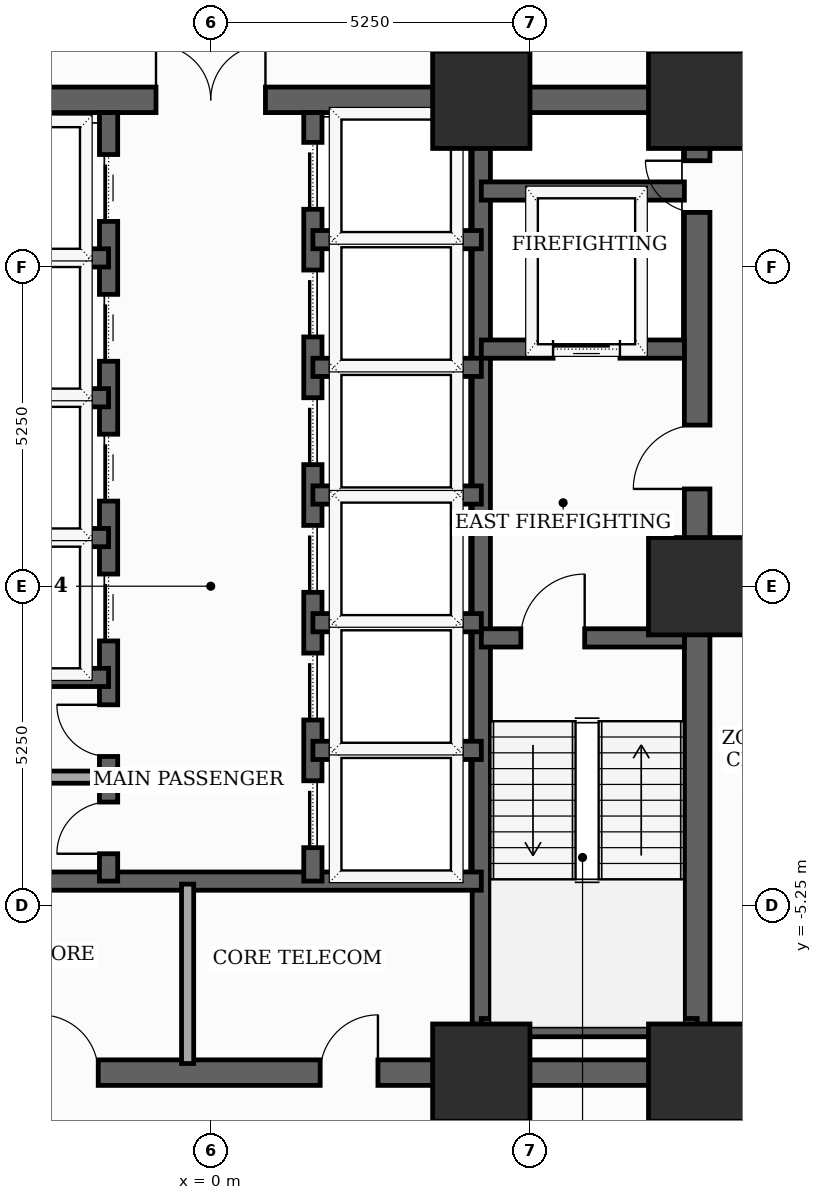
"""IFC4 building model, lengths in metres.
Left out: names, types, materials, properties, quantities, classifications, styles, units other than length and angle.
Written with IfcOpenShell. Run it as: python <this file> out.ifc"""

import sys

from ifc_helpers import new_model, si_unit, direction, frame, frame_2d, origin, origin_2d, place, context, subcontext, project, spatial, rectangle, extrude, element, fill, save


model = new_model("IFC4")
c1 = context("Model", 3, precision=1e-05, world=origin(), true_north=direction((0.0, 1.0)))
c2 = subcontext(c1, "Body", "Model", "MODEL_VIEW")
j1 = project(units=[si_unit("LENGTHUNIT", "METRE"), si_unit("PLANEANGLEUNIT", "RADIAN")], contexts=[c1])
p1 = place(None, origin())
s1 = spatial("IfcSite", under=j1, at=p1, CompositionType="ELEMENT")
p2 = place(p1, origin())
s2 = spatial("IfcBuilding", under=s1, at=p2, CompositionType="ELEMENT")
p3 = place(p2, frame((0.0, 0.0, 63.0)))
s3 = spatial("IfcBuildingStorey", under=s2, at=p3, CompositionType="ELEMENT", Elevation=63.0)
for number, where, z_axis, x_axis in (
    (1, (4.45, -8.0, 0.0), (0.0, 0.0, 1.0), (1.0, 0.0, 0.0)),
    (2, (8.0, -8.0, 0.0), (0.0, 0.0, 1.0), (1.0, 0.0, 0.0)),
    (3, (8.0, 0.0, 0.0), (0.0, 0.0, 1.0), (1.0, 0.0, 0.0)),
    (4, (8.0, 8.0, 0.0), (0.0, 0.0, 1.0), (1.0, 0.0, 0.0)),
    (5, (4.45, 8.0, 0.0), (0.0, 0.0, 1.0), (1.0, 0.0, 0.0)),
):
    element("IfcColumn", number, at=place(p3, frame(where, z_axis=z_axis, x_axis=x_axis)), inside=s3, PredefinedType="COLUMN", context=c2, shape_type="SweptSolid", body=[
        extrude(rectangle(XDim=1.6, YDim=1.6, at=origin_2d()), origin(), (0.0, 0.0, 1.0), 3.7),
    ])
p4 = place(p3, frame((8.0, -8.0, 0.0), z_axis=(0.0, 0.0, 1.0), x_axis=(0.0, 1.0, 0.0)))
e6 = element("IfcWall", 6, at=p4, inside=s3, PredefinedType="SHEAR", context=c2, shape_type="SweptSolid", body=[
    extrude(rectangle(XDim=16.0, YDim=0.42, at=frame_2d((8.0, 0.0))), origin(), (0.0, 0.0, 1.0), 3.5),
])
p5 = place(p4, frame((9.6, 0.0, 0.0)))
e7 = element("IfcOpeningElement", 7, at=p5, cuts=e6, PredefinedType="OPENING", context=c2, shape_type="SweptSolid", body=[
    extrude(rectangle(XDim=1.05, YDim=2.15, at=frame_2d((0.525, 1.075))), frame((0.0, 0.22, 0.0), z_axis=(0.0, -1.0, 0.0), x_axis=(1.0, 0.0, 0.0)), (0.0, 0.0, 1.0), 0.44),
])
p6 = place(p4, frame((14.148, 0.0, 0.0)))
e8 = element("IfcOpeningElement", 8, at=p6, cuts=e6, PredefinedType="OPENING", context=c2, shape_type="SweptSolid", body=[
    extrude(rectangle(XDim=0.85, YDim=2.02, at=frame_2d((0.425, 1.01))), frame((0.0, 0.22, 0.0), z_axis=(0.0, -1.0, 0.0), x_axis=(1.0, 0.0, 0.0)), (0.0, 0.0, 1.0), 0.44),
])
p7 = place(p3, frame((-8.0, -8.0, 0.0), z_axis=(0.0, 0.0, 1.0), x_axis=(1.0, 0.0, 0.0)))
e9 = element("IfcWall", 9, at=p7, inside=s3, PredefinedType="SHEAR", context=c2, shape_type="SweptSolid", body=[
    extrude(rectangle(XDim=16.0, YDim=0.42, at=frame_2d((8.0, 0.0))), origin(), (0.0, 0.0, 1.0), 3.5),
])
p8 = place(p7, frame((5.2, 0.0, 0.0)))
e10 = element("IfcOpeningElement", 10, at=p8, cuts=e9, PredefinedType="OPENING", context=c2, shape_type="SweptSolid", body=[
    extrude(rectangle(XDim=0.95, YDim=2.1, at=frame_2d((0.475, 1.05))), frame((0.0, 0.22, 0.0), z_axis=(0.0, -1.0, 0.0), x_axis=(1.0, 0.0, 0.0)), (0.0, 0.0, 1.0), 0.44),
])
p9 = place(p7, frame((9.8, 0.0, 0.0)))
e11 = element("IfcOpeningElement", 11, at=p9, cuts=e9, PredefinedType="OPENING", context=c2, shape_type="SweptSolid", body=[
    extrude(rectangle(XDim=0.95, YDim=2.1, at=frame_2d((0.475, 1.05))), frame((0.0, 0.22, 0.0), z_axis=(0.0, -1.0, 0.0), x_axis=(1.0, 0.0, 0.0)), (0.0, 0.0, 1.0), 0.44),
])
p10 = place(p3, frame((-8.0, 8.0, 0.0), z_axis=(0.0, 0.0, 1.0), x_axis=(1.0, 0.0, 0.0)))
e12 = element("IfcWall", 12, at=p10, inside=s3, PredefinedType="SHEAR", context=c2, shape_type="SweptSolid", body=[
    extrude(rectangle(XDim=16.0, YDim=0.42, at=frame_2d((8.0, 0.0))), origin(), (0.0, 0.0, 1.0), 3.5),
])
p11 = place(p10, frame((7.1, 0.0, 0.0)))
e13 = element("IfcOpeningElement", 13, at=p11, cuts=e12, PredefinedType="OPENING", context=c2, shape_type="SweptSolid", body=[
    extrude(rectangle(XDim=1.8, YDim=2.15, at=frame_2d((0.9, 1.075))), frame((0.0, 0.22, 0.0), z_axis=(0.0, -1.0, 0.0), x_axis=(1.0, 0.0, 0.0)), (0.0, 0.0, 1.0), 0.44),
])
p12 = place(p3, frame((4.45, -7.79, 0.0), z_axis=(0.0, 0.0, 1.0), x_axis=(0.0, 1.0, 0.0)))
e14 = element("IfcWall", 14, at=p12, inside=s3, PredefinedType="SHEAR", context=c2, shape_type="SweptSolid", body=[
    extrude(rectangle(XDim=15.58, YDim=0.3, at=frame_2d((7.79, 0.0))), origin(), (0.0, 0.0, 1.0), 3.5),
])
p13 = place(p3, frame((4.45, -0.85, 0.0), z_axis=(0.0, 0.0, 1.0), x_axis=(1.0, 0.0, 0.0)))
e15 = element("IfcWall", 15, at=p13, inside=s3, PredefinedType="SHEAR", context=c2, shape_type="SweptSolid", body=[
    extrude(rectangle(XDim=3.34, YDim=0.3, at=frame_2d((1.67, 0.0))), origin(), (0.0, 0.0, 1.0), 3.5),
])
p14 = place(p13, frame((0.65, 0.0, 0.0)))
e16 = element("IfcOpeningElement", 16, at=p14, cuts=e15, PredefinedType="OPENING", context=c2, shape_type="SweptSolid", body=[
    extrude(rectangle(XDim=1.05, YDim=2.15, at=frame_2d((0.525, 1.075))), frame((0.0, 0.16, 0.0), z_axis=(0.0, -1.0, 0.0), x_axis=(1.0, 0.0, 0.0)), (0.0, 0.0, 1.0), 0.32),
])
p15 = place(p3, frame((4.45, -7.26, 0.0), z_axis=(0.0, 0.0, 1.0), x_axis=(1.0, 0.0, 0.0)))
e17 = element("IfcWall", 17, at=p15, inside=s3, PredefinedType="SHEAR", context=c2, shape_type="SweptSolid", body=[
    extrude(rectangle(XDim=3.55, YDim=0.3, at=frame_2d((1.775, 0.0))), origin(), (0.0, 0.0, 1.0), 3.5),
])
p16 = place(p3, frame((4.45, 3.9, 0.0), z_axis=(0.0, 0.0, 1.0), x_axis=(1.0, 0.0, 0.0)))
e18 = element("IfcWall", 18, at=p16, inside=s3, PredefinedType="SHEAR", context=c2, shape_type="SweptSolid", body=[
    extrude(rectangle(XDim=3.34, YDim=0.3, at=frame_2d((1.67, 0.0))), origin(), (0.0, 0.0, 1.0), 3.5),
])
p17 = place(p16, frame((1.18, 0.0, 0.0)))
e19 = element("IfcOpeningElement", 19, at=p17, cuts=e18, PredefinedType="OPENING", context=c2, shape_type="SweptSolid", body=[
    extrude(rectangle(XDim=1.1, YDim=2.1, at=frame_2d((0.55, 1.05))), frame((0.0, 0.16, 0.0), z_axis=(0.0, -1.0, 0.0), x_axis=(1.0, 0.0, 0.0)), (0.0, 0.0, 1.0), 0.32),
])
p18 = place(p3, frame((4.45, 6.5, 0.0), z_axis=(0.0, 0.0, 1.0), x_axis=(1.0, 0.0, 0.0)))
e20 = element("IfcWall", 20, at=p18, inside=s3, PredefinedType="SHEAR", context=c2, shape_type="SweptSolid", body=[
    extrude(rectangle(XDim=3.34, YDim=0.3, at=frame_2d((1.67, 0.0))), origin(), (0.0, 0.0, 1.0), 3.5),
])
p19 = place(p3, frame((-4.45, -4.85, 0.0), z_axis=(0.0, 0.0, 1.0), x_axis=(1.0, 0.0, 0.0)))
e21 = element("IfcWall", 21, at=p19, inside=s3, PredefinedType="SHEAR", context=c2, shape_type="SweptSolid", body=[
    extrude(rectangle(XDim=8.9, YDim=0.3, at=frame_2d((4.45, 0.0))), origin(), (0.0, 0.0, 1.0), 3.5),
])
p20 = place(p3, frame((-1.68, -4.85, 0.0), z_axis=(0.0, 0.0, 1.0), x_axis=(0.0, 1.0, 0.0)))
e22 = element("IfcWall", 22, at=p20, inside=s3, PredefinedType="SHEAR", context=c2, shape_type="SweptSolid", body=[
    extrude(rectangle(XDim=12.64, YDim=0.3, at=frame_2d((6.32, 0.0))), origin(), (0.0, 0.0, 1.0), 3.5),
])
p21 = place(p20, frame((3.95, 0.0, 0.0)))
e23 = element("IfcOpeningElement", 23, at=p21, cuts=e22, PredefinedType="OPENING", context=c2, shape_type="SweptSolid", body=[
    extrude(rectangle(XDim=1.1, YDim=2.1, at=frame_2d((0.55, 1.05))), frame((0.0, 0.16, 0.0), z_axis=(0.0, -1.0, 0.0), x_axis=(1.0, 0.0, 0.0)), (0.0, 0.0, 1.0), 0.32),
])
p22 = place(p20, frame((6.25, 0.0, 0.0)))
e24 = element("IfcOpeningElement", 24, at=p22, cuts=e22, PredefinedType="OPENING", context=c2, shape_type="SweptSolid", body=[
    extrude(rectangle(XDim=1.1, YDim=2.1, at=frame_2d((0.55, 1.05))), frame((0.0, 0.16, 0.0), z_axis=(0.0, -1.0, 0.0), x_axis=(1.0, 0.0, 0.0)), (0.0, 0.0, 1.0), 0.32),
])
p23 = place(p20, frame((8.55, 0.0, 0.0)))
e25 = element("IfcOpeningElement", 25, at=p23, cuts=e22, PredefinedType="OPENING", context=c2, shape_type="SweptSolid", body=[
    extrude(rectangle(XDim=1.1, YDim=2.1, at=frame_2d((0.55, 1.05))), frame((0.0, 0.16, 0.0), z_axis=(0.0, -1.0, 0.0), x_axis=(1.0, 0.0, 0.0)), (0.0, 0.0, 1.0), 0.32),
])
p24 = place(p20, frame((10.85, 0.0, 0.0)))
e26 = element("IfcOpeningElement", 26, at=p24, cuts=e22, PredefinedType="OPENING", context=c2, shape_type="SweptSolid", body=[
    extrude(rectangle(XDim=1.1, YDim=2.1, at=frame_2d((0.55, 1.05))), frame((0.0, 0.16, 0.0), z_axis=(0.0, -1.0, 0.0), x_axis=(1.0, 0.0, 0.0)), (0.0, 0.0, 1.0), 0.32),
])
p25 = place(p20, frame((0.45, 0.0, 0.0)))
e27 = element("IfcOpeningElement", 27, at=p25, cuts=e22, PredefinedType="OPENING", context=c2, shape_type="SweptSolid", body=[
    extrude(rectangle(XDim=0.85, YDim=2.02, at=frame_2d((0.425, 1.01))), frame((0.0, 0.16, 0.0), z_axis=(0.0, -1.0, 0.0), x_axis=(1.0, 0.0, 0.0)), (0.0, 0.0, 1.0), 0.32),
])
p26 = place(p20, frame((2.05, 0.0, 0.0)))
e28 = element("IfcOpeningElement", 28, at=p26, cuts=e22, PredefinedType="OPENING", context=c2, shape_type="SweptSolid", body=[
    extrude(rectangle(XDim=0.85, YDim=2.02, at=frame_2d((0.425, 1.01))), frame((0.0, 0.16, 0.0), z_axis=(0.0, -1.0, 0.0), x_axis=(1.0, 0.0, 0.0)), (0.0, 0.0, 1.0), 0.32),
])
p27 = place(p3, frame((1.68, -4.85, 0.0), z_axis=(0.0, 0.0, 1.0), x_axis=(0.0, 1.0, 0.0)))
e29 = element("IfcWall", 29, at=p27, inside=s3, PredefinedType="SHEAR", context=c2, shape_type="SweptSolid", body=[
    extrude(rectangle(XDim=12.64, YDim=0.3, at=frame_2d((6.32, 0.0))), origin(), (0.0, 0.0, 1.0), 3.5),
])
p28 = place(p27, frame((0.55, 0.0, 0.0)))
e30 = element("IfcOpeningElement", 30, at=p28, cuts=e29, PredefinedType="OPENING", context=c2, shape_type="SweptSolid", body=[
    extrude(rectangle(XDim=1.1, YDim=2.1, at=frame_2d((0.55, 1.05))), frame((0.0, 0.16, 0.0), z_axis=(0.0, -1.0, 0.0), x_axis=(1.0, 0.0, 0.0)), (0.0, 0.0, 1.0), 0.32),
])
p29 = place(p27, frame((2.65, 0.0, 0.0)))
e31 = element("IfcOpeningElement", 31, at=p29, cuts=e29, PredefinedType="OPENING", context=c2, shape_type="SweptSolid", body=[
    extrude(rectangle(XDim=1.1, YDim=2.1, at=frame_2d((0.55, 1.05))), frame((0.0, 0.16, 0.0), z_axis=(0.0, -1.0, 0.0), x_axis=(1.0, 0.0, 0.0)), (0.0, 0.0, 1.0), 0.32),
])
p30 = place(p27, frame((4.75, 0.0, 0.0)))
e32 = element("IfcOpeningElement", 32, at=p30, cuts=e29, PredefinedType="OPENING", context=c2, shape_type="SweptSolid", body=[
    extrude(rectangle(XDim=1.1, YDim=2.1, at=frame_2d((0.55, 1.05))), frame((0.0, 0.16, 0.0), z_axis=(0.0, -1.0, 0.0), x_axis=(1.0, 0.0, 0.0)), (0.0, 0.0, 1.0), 0.32),
])
p31 = place(p27, frame((6.85, 0.0, 0.0)))
e33 = element("IfcOpeningElement", 33, at=p31, cuts=e29, PredefinedType="OPENING", context=c2, shape_type="SweptSolid", body=[
    extrude(rectangle(XDim=1.1, YDim=2.1, at=frame_2d((0.55, 1.05))), frame((0.0, 0.16, 0.0), z_axis=(0.0, -1.0, 0.0), x_axis=(1.0, 0.0, 0.0)), (0.0, 0.0, 1.0), 0.32),
])
p32 = place(p27, frame((8.95, 0.0, 0.0)))
e34 = element("IfcOpeningElement", 34, at=p32, cuts=e29, PredefinedType="OPENING", context=c2, shape_type="SweptSolid", body=[
    extrude(rectangle(XDim=1.1, YDim=2.1, at=frame_2d((0.55, 1.05))), frame((0.0, 0.16, 0.0), z_axis=(0.0, -1.0, 0.0), x_axis=(1.0, 0.0, 0.0)), (0.0, 0.0, 1.0), 0.32),
])
p33 = place(p27, frame((11.05, 0.0, 0.0)))
e35 = element("IfcOpeningElement", 35, at=p33, cuts=e29, PredefinedType="OPENING", context=c2, shape_type="SweptSolid", body=[
    extrude(rectangle(XDim=1.1, YDim=2.1, at=frame_2d((0.55, 1.05))), frame((0.0, 0.16, 0.0), z_axis=(0.0, -1.0, 0.0), x_axis=(1.0, 0.0, 0.0)), (0.0, 0.0, 1.0), 0.32),
])
for number, where, z_axis, x_axis in (
    (36, (-4.45, -1.5, 0.0), (0.0, 0.0, 1.0), (1.0, 0.0, 0.0)),
    (37, (-4.45, 0.8, 0.0), (0.0, 0.0, 1.0), (1.0, 0.0, 0.0)),
    (38, (-4.45, 3.1, 0.0), (0.0, 0.0, 1.0), (1.0, 0.0, 0.0)),
    (39, (-4.45, 5.4, 0.0), (0.0, 0.0, 1.0), (1.0, 0.0, 0.0)),
    (40, (1.68, 1.5, 0.0), (0.0, 0.0, 1.0), (1.0, 0.0, 0.0)),
    (41, (1.68, 3.6, 0.0), (0.0, 0.0, 1.0), (1.0, 0.0, 0.0)),
    (42, (1.68, 5.7, 0.0), (0.0, 0.0, 1.0), (1.0, 0.0, 0.0)),
    (43, (1.68, -2.7, 0.0), (0.0, 0.0, 1.0), (1.0, 0.0, 0.0)),
    (44, (1.68, -0.6, 0.0), (0.0, 0.0, 1.0), (1.0, 0.0, 0.0)),
):
    element("IfcWall", number, at=place(p3, frame(where, z_axis=z_axis, x_axis=x_axis)), inside=s3, PredefinedType="SHEAR", context=c2, shape_type="SweptSolid", body=[
        extrude(rectangle(XDim=2.77, YDim=0.3, at=frame_2d((1.385, 0.0))), origin(), (0.0, 0.0, 1.0), 3.5),
    ])
p34 = place(p3, frame((-0.38, -7.85, 0.0), z_axis=(0.0, 0.0, 1.0), x_axis=(0.0, 1.0, 0.0)))
e45 = element("IfcWall", 45, at=p34, inside=s3, PredefinedType="SOLIDWALL", context=c2, shape_type="SweptSolid", body=[
    extrude(rectangle(XDim=2.95, YDim=0.2, at=frame_2d((1.475, 0.0))), origin(), (0.0, 0.0, 1.0), 2.885),
])
p35 = place(p3, frame((-4.4, -3.14, 0.0), z_axis=(0.0, 0.0, 1.0), x_axis=(1.0, 0.0, 0.0)))
e46 = element("IfcWall", 46, at=p35, inside=s3, PredefinedType="SOLIDWALL", context=c2, shape_type="SweptSolid", body=[
    extrude(rectangle(XDim=2.68, YDim=0.2, at=frame_2d((1.34, 0.0))), origin(), (0.0, 0.0, 1.0), 3.5),
])
p36 = place(p5, origin())
e47 = element("IfcDoor", 47, at=p36, inside=s3, OperationType="SINGLE_SWING_LEFT", PredefinedType="DOOR", context=c2, shape_type="SweptSolid", body=[
    extrude(rectangle(XDim=1.05, YDim=2.15, at=frame_2d((0.525, 1.075))), frame((0.0, 0.025, 0.0), z_axis=(0.0, -1.0, 0.0), x_axis=(1.0, 0.0, 0.0)), (0.0, 0.0, 1.0), 0.05),
])
fill(e7, e47)
p37 = place(p6, origin())
e48 = element("IfcDoor", 48, at=p37, inside=s3, OperationType="SINGLE_SWING_RIGHT", PredefinedType="TRAPDOOR", context=c2, shape_type="SweptSolid", body=[
    extrude(rectangle(XDim=0.85, YDim=2.02, at=frame_2d((0.425, 1.01))), frame((0.0, 0.025, 0.0), z_axis=(0.0, -1.0, 0.0), x_axis=(1.0, 0.0, 0.0)), (0.0, 0.0, 1.0), 0.05),
])
fill(e8, e48)
p38 = place(p8, origin())
e49 = element("IfcDoor", 49, at=p38, inside=s3, OperationType="SINGLE_SWING_LEFT", PredefinedType="DOOR", context=c2, shape_type="SweptSolid", body=[
    extrude(rectangle(XDim=0.95, YDim=2.1, at=frame_2d((0.475, 1.05))), frame((0.0, 0.025, 0.0), z_axis=(0.0, -1.0, 0.0), x_axis=(1.0, 0.0, 0.0)), (0.0, 0.0, 1.0), 0.05),
])
fill(e10, e49)
p39 = place(p9, origin())
e50 = element("IfcDoor", 50, at=p39, inside=s3, OperationType="SINGLE_SWING_RIGHT", PredefinedType="DOOR", context=c2, shape_type="SweptSolid", body=[
    extrude(rectangle(XDim=0.95, YDim=2.1, at=frame_2d((0.475, 1.05))), frame((0.0, 0.025, 0.0), z_axis=(0.0, -1.0, 0.0), x_axis=(1.0, 0.0, 0.0)), (0.0, 0.0, 1.0), 0.05),
])
fill(e11, e50)
p40 = place(p11, origin())
e51 = element("IfcDoor", 51, at=p40, inside=s3, OperationType="DOUBLE_DOOR_SINGLE_SWING", PredefinedType="DOOR", context=c2, shape_type="SweptSolid", body=[
    extrude(rectangle(XDim=1.8, YDim=2.15, at=frame_2d((0.9, 1.075))), frame((0.0, 0.025, 0.0), z_axis=(0.0, -1.0, 0.0), x_axis=(1.0, 0.0, 0.0)), (0.0, 0.0, 1.0), 0.05),
])
fill(e13, e51)
p41 = place(p14, origin())
e52 = element("IfcDoor", 52, at=p41, inside=s3, OperationType="SINGLE_SWING_RIGHT", PredefinedType="DOOR", context=c2, shape_type="SweptSolid", body=[
    extrude(rectangle(XDim=1.05, YDim=2.15, at=frame_2d((0.525, 1.075))), frame((0.0, 0.025, 0.0), z_axis=(0.0, -1.0, 0.0), x_axis=(1.0, 0.0, 0.0)), (0.0, 0.0, 1.0), 0.05),
])
fill(e16, e52)
p42 = place(p17, origin())
e53 = element("IfcDoor", 53, at=p42, inside=s3, OperationType="SLIDING_TO_LEFT", PredefinedType="DOOR", context=c2, shape_type="SweptSolid", body=[
    extrude(rectangle(XDim=1.1, YDim=2.1, at=frame_2d((0.55, 1.05))), frame((0.0, 0.025, 0.0), z_axis=(0.0, -1.0, 0.0), x_axis=(1.0, 0.0, 0.0)), (0.0, 0.0, 1.0), 0.05),
])
fill(e19, e53)
p43 = place(p21, origin())
e54 = element("IfcDoor", 54, at=p43, inside=s3, OperationType="SLIDING_TO_LEFT", PredefinedType="DOOR", context=c2, shape_type="SweptSolid", body=[
    extrude(rectangle(XDim=1.1, YDim=2.1, at=frame_2d((0.55, 1.05))), frame((0.0, 0.025, 0.0), z_axis=(0.0, -1.0, 0.0), x_axis=(1.0, 0.0, 0.0)), (0.0, 0.0, 1.0), 0.05),
])
fill(e23, e54)
p44 = place(p22, origin())
e55 = element("IfcDoor", 55, at=p44, inside=s3, OperationType="SLIDING_TO_LEFT", PredefinedType="DOOR", context=c2, shape_type="SweptSolid", body=[
    extrude(rectangle(XDim=1.1, YDim=2.1, at=frame_2d((0.55, 1.05))), frame((0.0, 0.025, 0.0), z_axis=(0.0, -1.0, 0.0), x_axis=(1.0, 0.0, 0.0)), (0.0, 0.0, 1.0), 0.05),
])
fill(e24, e55)
p45 = place(p23, origin())
e56 = element("IfcDoor", 56, at=p45, inside=s3, OperationType="SLIDING_TO_LEFT", PredefinedType="DOOR", context=c2, shape_type="SweptSolid", body=[
    extrude(rectangle(XDim=1.1, YDim=2.1, at=frame_2d((0.55, 1.05))), frame((0.0, 0.025, 0.0), z_axis=(0.0, -1.0, 0.0), x_axis=(1.0, 0.0, 0.0)), (0.0, 0.0, 1.0), 0.05),
])
fill(e25, e56)
p46 = place(p24, origin())
e57 = element("IfcDoor", 57, at=p46, inside=s3, OperationType="SLIDING_TO_LEFT", PredefinedType="DOOR", context=c2, shape_type="SweptSolid", body=[
    extrude(rectangle(XDim=1.1, YDim=2.1, at=frame_2d((0.55, 1.05))), frame((0.0, 0.025, 0.0), z_axis=(0.0, -1.0, 0.0), x_axis=(1.0, 0.0, 0.0)), (0.0, 0.0, 1.0), 0.05),
])
fill(e26, e57)
p47 = place(p25, origin())
e58 = element("IfcDoor", 58, at=p47, inside=s3, OperationType="SINGLE_SWING_LEFT", PredefinedType="TRAPDOOR", context=c2, shape_type="SweptSolid", body=[
    extrude(rectangle(XDim=0.85, YDim=2.02, at=frame_2d((0.425, 1.01))), frame((0.0, 0.025, 0.0), z_axis=(0.0, -1.0, 0.0), x_axis=(1.0, 0.0, 0.0)), (0.0, 0.0, 1.0), 0.05),
])
fill(e27, e58)
p48 = place(p26, origin())
e59 = element("IfcDoor", 59, at=p48, inside=s3, OperationType="SINGLE_SWING_RIGHT", PredefinedType="TRAPDOOR", context=c2, shape_type="SweptSolid", body=[
    extrude(rectangle(XDim=0.85, YDim=2.02, at=frame_2d((0.425, 1.01))), frame((0.0, 0.025, 0.0), z_axis=(0.0, -1.0, 0.0), x_axis=(1.0, 0.0, 0.0)), (0.0, 0.0, 1.0), 0.05),
])
fill(e28, e59)
p49 = place(p28, origin())
e60 = element("IfcDoor", 60, at=p49, inside=s3, OperationType="SLIDING_TO_LEFT", PredefinedType="DOOR", context=c2, shape_type="SweptSolid", body=[
    extrude(rectangle(XDim=1.1, YDim=2.1, at=frame_2d((0.55, 1.05))), frame((0.0, 0.025, 0.0), z_axis=(0.0, -1.0, 0.0), x_axis=(1.0, 0.0, 0.0)), (0.0, 0.0, 1.0), 0.05),
])
fill(e30, e60)
p50 = place(p29, origin())
e61 = element("IfcDoor", 61, at=p50, inside=s3, OperationType="SLIDING_TO_LEFT", PredefinedType="DOOR", context=c2, shape_type="SweptSolid", body=[
    extrude(rectangle(XDim=1.1, YDim=2.1, at=frame_2d((0.55, 1.05))), frame((0.0, 0.025, 0.0), z_axis=(0.0, -1.0, 0.0), x_axis=(1.0, 0.0, 0.0)), (0.0, 0.0, 1.0), 0.05),
])
fill(e31, e61)
p51 = place(p30, origin())
e62 = element("IfcDoor", 62, at=p51, inside=s3, OperationType="SLIDING_TO_LEFT", PredefinedType="DOOR", context=c2, shape_type="SweptSolid", body=[
    extrude(rectangle(XDim=1.1, YDim=2.1, at=frame_2d((0.55, 1.05))), frame((0.0, 0.025, 0.0), z_axis=(0.0, -1.0, 0.0), x_axis=(1.0, 0.0, 0.0)), (0.0, 0.0, 1.0), 0.05),
])
fill(e32, e62)
p52 = place(p31, origin())
e63 = element("IfcDoor", 63, at=p52, inside=s3, OperationType="SLIDING_TO_LEFT", PredefinedType="DOOR", context=c2, shape_type="SweptSolid", body=[
    extrude(rectangle(XDim=1.1, YDim=2.1, at=frame_2d((0.55, 1.05))), frame((0.0, 0.025, 0.0), z_axis=(0.0, -1.0, 0.0), x_axis=(1.0, 0.0, 0.0)), (0.0, 0.0, 1.0), 0.05),
])
fill(e33, e63)
p53 = place(p32, origin())
e64 = element("IfcDoor", 64, at=p53, inside=s3, OperationType="SLIDING_TO_LEFT", PredefinedType="DOOR", context=c2, shape_type="SweptSolid", body=[
    extrude(rectangle(XDim=1.1, YDim=2.1, at=frame_2d((0.55, 1.05))), frame((0.0, 0.025, 0.0), z_axis=(0.0, -1.0, 0.0), x_axis=(1.0, 0.0, 0.0)), (0.0, 0.0, 1.0), 0.05),
])
fill(e34, e64)
p54 = place(p33, origin())
e65 = element("IfcDoor", 65, at=p54, inside=s3, OperationType="SLIDING_TO_LEFT", PredefinedType="DOOR", context=c2, shape_type="SweptSolid", body=[
    extrude(rectangle(XDim=1.1, YDim=2.1, at=frame_2d((0.55, 1.05))), frame((0.0, 0.025, 0.0), z_axis=(0.0, -1.0, 0.0), x_axis=(1.0, 0.0, 0.0)), (0.0, 0.0, 1.0), 0.05),
])
fill(e35, e65)
save(model, sys.argv[1])
